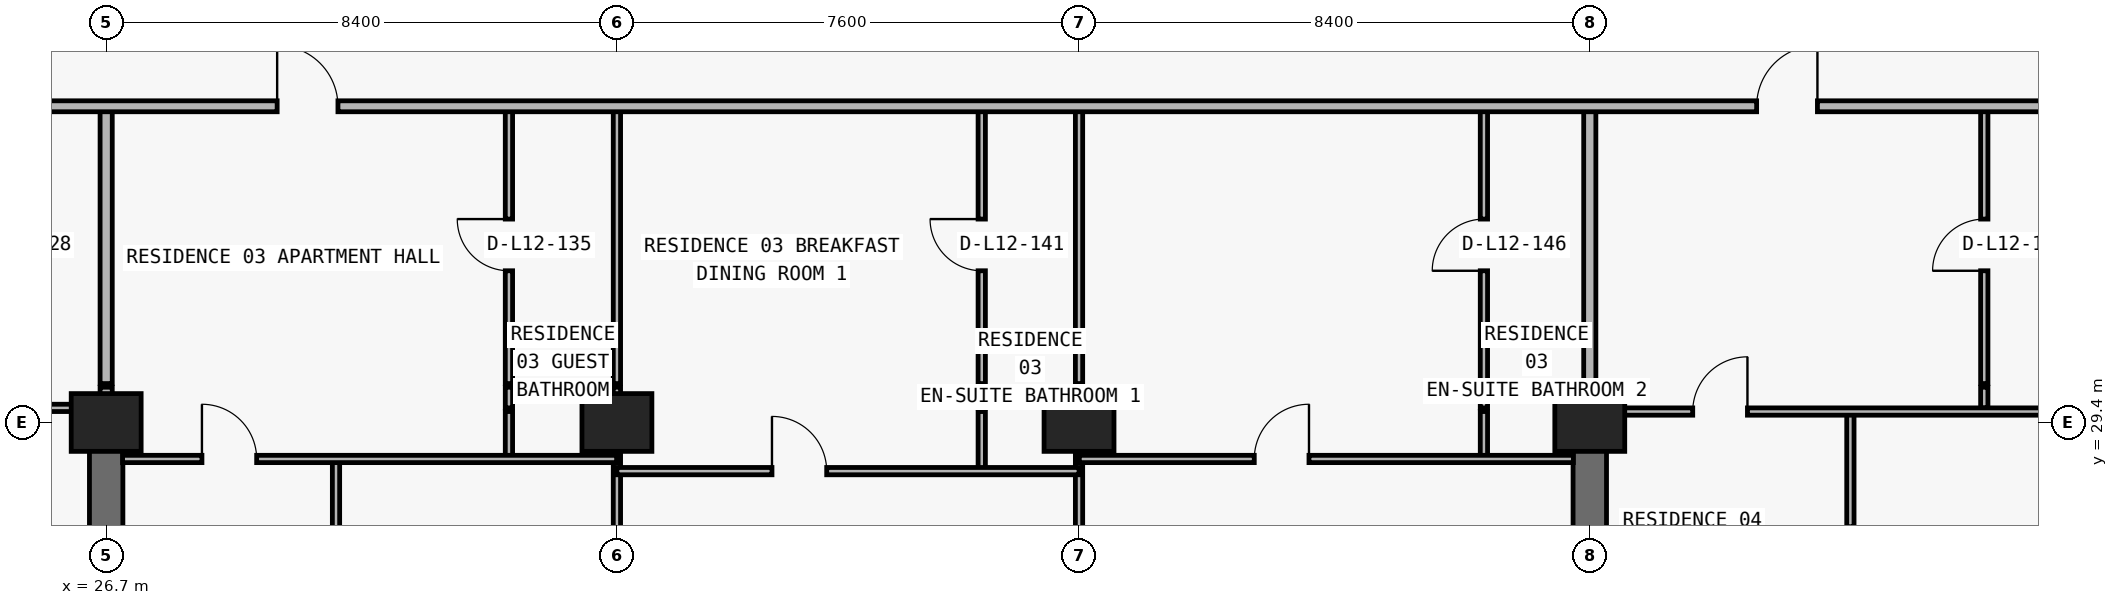
"""IFC4 building model, lengths in metres.
Left out: names, types, materials, properties, quantities, classifications, styles, units other than length and angle.
Written with IfcOpenShell. Run it as: python <this file> out.ifc"""

import sys

from ifc_helpers import new_model, si_unit, direction, frame, frame_2d, origin, origin_2d, place, context, subcontext, project, spatial, rectangle, extrude, element, fill, save


model = new_model("IFC4")
c1 = context("Model", 3, precision=1e-05, world=origin(), true_north=direction((0.0, 1.0)))
c2 = subcontext(c1, "Body", "Model", "MODEL_VIEW")
j1 = project(units=[si_unit("LENGTHUNIT", "METRE"), si_unit("PLANEANGLEUNIT", "RADIAN")], contexts=[c1])
p1 = place(None, origin())
s1 = spatial("IfcSite", under=j1, at=p1, CompositionType="ELEMENT")
p2 = place(p1, origin())
s2 = spatial("IfcBuilding", under=s1, at=p2, CompositionType="ELEMENT")
p3 = place(p2, frame((0.0, 0.0, 49.8)))
s3 = spatial("IfcBuildingStorey", under=s2, at=p3, CompositionType="ELEMENT", Elevation=49.8)
for number, where, z_axis, x_axis in (
    (1, (26.7, 29.4, 0.0), (0.0, 0.0, 1.0), (1.0, 0.0, 0.0)),
    (2, (35.1, 29.4, 0.0), (0.0, 0.0, 1.0), (1.0, 0.0, 0.0)),
    (3, (42.7, 29.4, 0.0), (0.0, 0.0, 1.0), (1.0, 0.0, 0.0)),
    (4, (51.1, 29.4, 0.0), (0.0, 0.0, 1.0), (1.0, 0.0, 0.0)),
):
    element("IfcColumn", number, at=place(p3, frame(where, z_axis=z_axis, x_axis=x_axis)), inside=s3, PredefinedType="COLUMN", context=c2, shape_type="SweptSolid", body=[
        extrude(rectangle(XDim=1.15, YDim=0.95, at=origin_2d()), origin(), (0.0, 0.0, 1.0), 3.05),
    ])
for number, where, z_axis, x_axis in (
    (5, (26.7, 20.8, 0.0), (0.0, 0.0, 1.0), (0.0, 1.0, 0.0)),
    (6, (51.1, 20.8, 0.0), (0.0, 0.0, 1.0), (0.0, 1.0, 0.0)),
):
    element("IfcWall", number, at=place(p3, frame(where, z_axis=z_axis, x_axis=x_axis)), inside=s3, PredefinedType="SHEAR", context=c2, shape_type="SweptSolid", body=[
        extrude(rectangle(XDim=8.6, YDim=0.55, at=frame_2d((4.3, 0.0))), origin(), (0.0, 0.0, 1.0), 3.05),
    ])
p4 = place(p3, frame((26.7, 29.64, 0.0), z_axis=(0.0, 0.0, 1.0), x_axis=(0.0, 1.0, 0.0)))
e7 = element("IfcWall", 7, at=p4, inside=s3, PredefinedType="PARTITIONING", context=c2, shape_type="SweptSolid", body=[
    extrude(rectangle(XDim=0.34, YDim=0.2, at=frame_2d((0.17, 0.0))), origin(), (0.0, 0.0, 1.0), 2.335),
])
p5 = place(p3, frame((26.7, 30.04, 0.0), z_axis=(0.0, 0.0, 1.0), x_axis=(0.0, 1.0, 0.0)))
e8 = element("IfcWall", 8, at=p5, inside=s3, PredefinedType="PARTITIONING", context=c2, shape_type="SweptSolid", body=[
    extrude(rectangle(XDim=4.56, YDim=0.2, at=frame_2d((2.28, 0.0))), origin(), (0.0, 0.0, 1.0), 2.335),
])
p6 = place(p3, frame((30.48, 24.89, 0.0), z_axis=(0.0, 0.0, 1.0), x_axis=(0.0, 1.0, 0.0)))
e9 = element("IfcWall", 9, at=p6, inside=s3, PredefinedType="PARTITIONING", context=c2, shape_type="SweptSolid", body=[
    extrude(rectangle(XDim=3.91, YDim=0.12, at=frame_2d((1.955, 0.0))), origin(), (0.0, 0.0, 1.0), 3.05),
])
p7 = place(p6, frame((1.505, 0.0, 0.0)))
e10 = element("IfcOpeningElement", 10, at=p7, cuts=e9, PredefinedType="OPENING", context=c2, shape_type="SweptSolid", body=[
    extrude(rectangle(XDim=0.9, YDim=2.15, at=frame_2d((0.45, 1.075))), frame((0.0, 0.07, 0.0), z_axis=(0.0, -1.0, 0.0), x_axis=(1.0, 0.0, 0.0)), (0.0, 0.0, 1.0), 0.14),
])
p8 = place(p3, frame((33.324, 28.8, 0.0), z_axis=(0.0, 0.0, 1.0), x_axis=(0.0, 1.0, 0.0)))
e11 = element("IfcWall", 11, at=p8, inside=s3, PredefinedType="PARTITIONING", context=c2, shape_type="SweptSolid", body=[
    extrude(rectangle(XDim=0.78, YDim=0.12, at=frame_2d((0.39, 0.0))), origin(), (0.0, 0.0, 1.0), 3.05),
])
p9 = place(p3, frame((33.324, 29.64, 0.0), z_axis=(0.0, 0.0, 1.0), x_axis=(0.0, 1.0, 0.0)))
e12 = element("IfcWall", 12, at=p9, inside=s3, PredefinedType="PARTITIONING", context=c2, shape_type="SweptSolid", body=[
    extrude(rectangle(XDim=0.34, YDim=0.12, at=frame_2d((0.17, 0.0))), origin(), (0.0, 0.0, 1.0), 3.05),
])
p10 = place(p3, frame((33.324, 30.04, 0.0), z_axis=(0.0, 0.0, 1.0), x_axis=(0.0, 1.0, 0.0)))
e13 = element("IfcWall", 13, at=p10, inside=s3, PredefinedType="PARTITIONING", context=c2, shape_type="SweptSolid", body=[
    extrude(rectangle(XDim=4.56, YDim=0.12, at=frame_2d((2.28, 0.0))), origin(), (0.0, 0.0, 1.0), 3.05),
])
p11 = place(p10, frame((1.855, 0.0, 0.0)))
e14 = element("IfcOpeningElement", 14, at=p11, cuts=e13, PredefinedType="OPENING", context=c2, shape_type="SweptSolid", body=[
    extrude(rectangle(XDim=0.85, YDim=2.1, at=frame_2d((0.425, 1.05))), frame((0.0, 0.07, 0.0), z_axis=(0.0, -1.0, 0.0), x_axis=(1.0, 0.0, 0.0)), (0.0, 0.0, 1.0), 0.14),
])
p12 = place(p3, frame((35.1, 24.89, 0.0), z_axis=(0.0, 0.0, 1.0), x_axis=(0.0, 1.0, 0.0)))
e15 = element("IfcWall", 15, at=p12, inside=s3, PredefinedType="PARTITIONING", context=c2, shape_type="SweptSolid", body=[
    extrude(rectangle(XDim=4.69, YDim=0.12, at=frame_2d((2.345, 0.0))), origin(), (0.0, 0.0, 1.0), 2.11),
])
p13 = place(p12, frame((1.405, 0.0, 0.0)))
e16 = element("IfcOpeningElement", 16, at=p13, cuts=e15, PredefinedType="OPENING", context=c2, shape_type="SweptSolid", body=[
    extrude(rectangle(XDim=0.9, YDim=2.06, at=frame_2d((0.45, 1.03))), frame((0.0, 0.07, 0.0), z_axis=(0.0, -1.0, 0.0), x_axis=(1.0, 0.0, 0.0)), (0.0, 0.0, 1.0), 0.14),
])
p14 = place(p3, frame((35.1, 29.64, 0.0), z_axis=(0.0, 0.0, 1.0), x_axis=(0.0, 1.0, 0.0)))
e17 = element("IfcWall", 17, at=p14, inside=s3, PredefinedType="PARTITIONING", context=c2, shape_type="SweptSolid", body=[
    extrude(rectangle(XDim=0.34, YDim=0.12, at=frame_2d((0.17, 0.0))), origin(), (0.0, 0.0, 1.0), 2.11),
])
p15 = place(p3, frame((35.1, 30.04, 0.0), z_axis=(0.0, 0.0, 1.0), x_axis=(0.0, 1.0, 0.0)))
e18 = element("IfcWall", 18, at=p15, inside=s3, PredefinedType="PARTITIONING", context=c2, shape_type="SweptSolid", body=[
    extrude(rectangle(XDim=4.56, YDim=0.12, at=frame_2d((2.28, 0.0))), origin(), (0.0, 0.0, 1.0), 2.11),
])
p16 = place(p3, frame((41.1, 28.6, 0.0), z_axis=(0.0, 0.0, 1.0), x_axis=(0.0, 1.0, 0.0)))
e19 = element("IfcWall", 19, at=p16, inside=s3, PredefinedType="PARTITIONING", context=c2, shape_type="SweptSolid", body=[
    extrude(rectangle(XDim=0.98, YDim=0.12, at=frame_2d((0.49, 0.0))), origin(), (0.0, 0.0, 1.0), 3.05),
])
p17 = place(p3, frame((41.1, 29.64, 0.0), z_axis=(0.0, 0.0, 1.0), x_axis=(0.0, 1.0, 0.0)))
e20 = element("IfcWall", 20, at=p17, inside=s3, PredefinedType="PARTITIONING", context=c2, shape_type="SweptSolid", body=[
    extrude(rectangle(XDim=0.34, YDim=0.12, at=frame_2d((0.17, 0.0))), origin(), (0.0, 0.0, 1.0), 3.05),
])
p18 = place(p3, frame((41.1, 30.04, 0.0), z_axis=(0.0, 0.0, 1.0), x_axis=(0.0, 1.0, 0.0)))
e21 = element("IfcWall", 21, at=p18, inside=s3, PredefinedType="PARTITIONING", context=c2, shape_type="SweptSolid", body=[
    extrude(rectangle(XDim=4.56, YDim=0.12, at=frame_2d((2.28, 0.0))), origin(), (0.0, 0.0, 1.0), 3.05),
])
p19 = place(p18, frame((1.855, 0.0, 0.0)))
e22 = element("IfcOpeningElement", 22, at=p19, cuts=e21, PredefinedType="OPENING", context=c2, shape_type="SweptSolid", body=[
    extrude(rectangle(XDim=0.85, YDim=2.1, at=frame_2d((0.425, 1.05))), frame((0.0, 0.07, 0.0), z_axis=(0.0, -1.0, 0.0), x_axis=(1.0, 0.0, 0.0)), (0.0, 0.0, 1.0), 0.14),
])
p20 = place(p3, frame((42.7, 24.89, 0.0), z_axis=(0.0, 0.0, 1.0), x_axis=(0.0, 1.0, 0.0)))
e23 = element("IfcWall", 23, at=p20, inside=s3, PredefinedType="PARTITIONING", context=c2, shape_type="SweptSolid", body=[
    extrude(rectangle(XDim=4.69, YDim=0.12, at=frame_2d((2.345, 0.0))), origin(), (0.0, 0.0, 1.0), 2.11),
])
p21 = place(p20, frame((1.405, 0.0, 0.0)))
e24 = element("IfcOpeningElement", 24, at=p21, cuts=e23, PredefinedType="OPENING", context=c2, shape_type="SweptSolid", body=[
    extrude(rectangle(XDim=0.9, YDim=2.06, at=frame_2d((0.45, 1.03))), frame((0.0, 0.07, 0.0), z_axis=(0.0, -1.0, 0.0), x_axis=(1.0, 0.0, 0.0)), (0.0, 0.0, 1.0), 0.14),
])
p22 = place(p3, frame((42.7, 29.64, 0.0), z_axis=(0.0, 0.0, 1.0), x_axis=(0.0, 1.0, 0.0)))
e25 = element("IfcWall", 25, at=p22, inside=s3, PredefinedType="PARTITIONING", context=c2, shape_type="SweptSolid", body=[
    extrude(rectangle(XDim=0.34, YDim=0.12, at=frame_2d((0.17, 0.0))), origin(), (0.0, 0.0, 1.0), 2.11),
])
p23 = place(p3, frame((42.7, 30.04, 0.0), z_axis=(0.0, 0.0, 1.0), x_axis=(0.0, 1.0, 0.0)))
e26 = element("IfcWall", 26, at=p23, inside=s3, PredefinedType="PARTITIONING", context=c2, shape_type="SweptSolid", body=[
    extrude(rectangle(XDim=4.56, YDim=0.12, at=frame_2d((2.28, 0.0))), origin(), (0.0, 0.0, 1.0), 2.11),
])
p24 = place(p3, frame((49.359, 28.8, 0.0), z_axis=(0.0, 0.0, 1.0), x_axis=(0.0, 1.0, 0.0)))
e27 = element("IfcWall", 27, at=p24, inside=s3, PredefinedType="PARTITIONING", context=c2, shape_type="SweptSolid", body=[
    extrude(rectangle(XDim=0.78, YDim=0.12, at=frame_2d((0.39, 0.0))), origin(), (0.0, 0.0, 1.0), 3.05),
])
p25 = place(p3, frame((49.359, 29.64, 0.0), z_axis=(0.0, 0.0, 1.0), x_axis=(0.0, 1.0, 0.0)))
e28 = element("IfcWall", 28, at=p25, inside=s3, PredefinedType="PARTITIONING", context=c2, shape_type="SweptSolid", body=[
    extrude(rectangle(XDim=0.34, YDim=0.12, at=frame_2d((0.17, 0.0))), origin(), (0.0, 0.0, 1.0), 3.05),
])
p26 = place(p3, frame((49.359, 30.04, 0.0), z_axis=(0.0, 0.0, 1.0), x_axis=(0.0, 1.0, 0.0)))
e29 = element("IfcWall", 29, at=p26, inside=s3, PredefinedType="PARTITIONING", context=c2, shape_type="SweptSolid", body=[
    extrude(rectangle(XDim=4.56, YDim=0.12, at=frame_2d((2.28, 0.0))), origin(), (0.0, 0.0, 1.0), 3.05),
])
p27 = place(p26, frame((1.855, 0.0, 0.0)))
e30 = element("IfcOpeningElement", 30, at=p27, cuts=e29, PredefinedType="OPENING", context=c2, shape_type="SweptSolid", body=[
    extrude(rectangle(XDim=0.85, YDim=2.1, at=frame_2d((0.425, 1.05))), frame((0.0, 0.07, 0.0), z_axis=(0.0, -1.0, 0.0), x_axis=(1.0, 0.0, 0.0)), (0.0, 0.0, 1.0), 0.14),
])
p28 = place(p3, frame((51.1, 29.64, 0.0), z_axis=(0.0, 0.0, 1.0), x_axis=(0.0, 1.0, 0.0)))
e31 = element("IfcWall", 31, at=p28, inside=s3, PredefinedType="PARTITIONING", context=c2, shape_type="SweptSolid", body=[
    extrude(rectangle(XDim=0.34, YDim=0.2, at=frame_2d((0.17, 0.0))), origin(), (0.0, 0.0, 1.0), 2.335),
])
p29 = place(p3, frame((51.1, 30.04, 0.0), z_axis=(0.0, 0.0, 1.0), x_axis=(0.0, 1.0, 0.0)))
e32 = element("IfcWall", 32, at=p29, inside=s3, PredefinedType="PARTITIONING", context=c2, shape_type="SweptSolid", body=[
    extrude(rectangle(XDim=4.56, YDim=0.2, at=frame_2d((2.28, 0.0))), origin(), (0.0, 0.0, 1.0), 2.335),
])
p30 = place(p3, frame((55.386, 24.89, 0.0), z_axis=(0.0, 0.0, 1.0), x_axis=(0.0, 1.0, 0.0)))
e33 = element("IfcWall", 33, at=p30, inside=s3, PredefinedType="PARTITIONING", context=c2, shape_type="SweptSolid", body=[
    extrude(rectangle(XDim=4.69, YDim=0.12, at=frame_2d((2.345, 0.0))), origin(), (0.0, 0.0, 1.0), 3.05),
])
p31 = place(p30, frame((1.895, 0.0, 0.0)))
e34 = element("IfcOpeningElement", 34, at=p31, cuts=e33, PredefinedType="OPENING", context=c2, shape_type="SweptSolid", body=[
    extrude(rectangle(XDim=0.9, YDim=2.15, at=frame_2d((0.45, 1.075))), frame((0.0, 0.07, 0.0), z_axis=(0.0, -1.0, 0.0), x_axis=(1.0, 0.0, 0.0)), (0.0, 0.0, 1.0), 0.14),
])
p32 = place(p3, frame((57.588, 29.64, 0.0), z_axis=(0.0, 0.0, 1.0), x_axis=(0.0, 1.0, 0.0)))
e35 = element("IfcWall", 35, at=p32, inside=s3, PredefinedType="PARTITIONING", context=c2, shape_type="SweptSolid", body=[
    extrude(rectangle(XDim=0.34, YDim=0.12, at=frame_2d((0.17, 0.0))), origin(), (0.0, 0.0, 1.0), 3.05),
])
p33 = place(p3, frame((57.588, 30.04, 0.0), z_axis=(0.0, 0.0, 1.0), x_axis=(0.0, 1.0, 0.0)))
e36 = element("IfcWall", 36, at=p33, inside=s3, PredefinedType="PARTITIONING", context=c2, shape_type="SweptSolid", body=[
    extrude(rectangle(XDim=4.56, YDim=0.12, at=frame_2d((2.28, 0.0))), origin(), (0.0, 0.0, 1.0), 3.05),
])
p34 = place(p33, frame((1.855, 0.0, 0.0)))
e37 = element("IfcOpeningElement", 37, at=p34, cuts=e36, PredefinedType="OPENING", context=c2, shape_type="SweptSolid", body=[
    extrude(rectangle(XDim=0.85, YDim=2.1, at=frame_2d((0.425, 1.05))), frame((0.0, 0.07, 0.0), z_axis=(0.0, -1.0, 0.0), x_axis=(1.0, 0.0, 0.0)), (0.0, 0.0, 1.0), 0.14),
])
p35 = place(p3, frame((35.1, 28.6, 0.0), z_axis=(0.0, 0.0, 1.0), x_axis=(1.0, 0.0, 0.0)))
e38 = element("IfcWall", 38, at=p35, inside=s3, PredefinedType="PARTITIONING", context=c2, shape_type="SweptSolid", body=[
    extrude(rectangle(XDim=7.6, YDim=0.12, at=frame_2d((3.8, 0.0))), origin(), (0.0, 0.0, 1.0), 3.05),
])
p36 = place(p35, frame((2.55, 0.0, 0.0)))
e39 = element("IfcOpeningElement", 39, at=p36, cuts=e38, PredefinedType="OPENING", context=c2, shape_type="SweptSolid", body=[
    extrude(rectangle(XDim=0.9, YDim=2.15, at=frame_2d((0.45, 1.075))), frame((0.0, 0.07, 0.0), z_axis=(0.0, -1.0, 0.0), x_axis=(1.0, 0.0, 0.0)), (0.0, 0.0, 1.0), 0.14),
])
p37 = place(p3, frame((26.97, 28.8, 0.0), z_axis=(0.0, 0.0, 1.0), x_axis=(1.0, 0.0, 0.0)))
e40 = element("IfcWall", 40, at=p37, inside=s3, PredefinedType="PARTITIONING", context=c2, shape_type="SweptSolid", body=[
    extrude(rectangle(XDim=8.125, YDim=0.12, at=frame_2d((4.062, 0.0))), origin(), (0.0, 0.0, 1.0), 3.05),
])
p38 = place(p37, frame((1.305, 0.0, 0.0)))
e41 = element("IfcOpeningElement", 41, at=p38, cuts=e40, PredefinedType="OPENING", context=c2, shape_type="SweptSolid", body=[
    extrude(rectangle(XDim=0.9, YDim=2.15, at=frame_2d((0.45, 1.075))), frame((0.0, 0.07, 0.0), z_axis=(0.0, -1.0, 0.0), x_axis=(1.0, 0.0, 0.0)), (0.0, 0.0, 1.0), 0.14),
])
p39 = place(p3, frame((42.705, 28.8, 0.0), z_axis=(0.0, 0.0, 1.0), x_axis=(1.0, 0.0, 0.0)))
e42 = element("IfcWall", 42, at=p39, inside=s3, PredefinedType="PARTITIONING", context=c2, shape_type="SweptSolid", body=[
    extrude(rectangle(XDim=8.125, YDim=0.12, at=frame_2d((4.062, 0.0))), origin(), (0.0, 0.0, 1.0), 3.05),
])
p40 = place(p39, frame((2.877, 0.0, 0.0)))
e43 = element("IfcOpeningElement", 43, at=p40, cuts=e42, PredefinedType="OPENING", context=c2, shape_type="SweptSolid", body=[
    extrude(rectangle(XDim=0.9, YDim=2.15, at=frame_2d((0.45, 1.075))), frame((0.0, 0.07, 0.0), z_axis=(0.0, -1.0, 0.0), x_axis=(1.0, 0.0, 0.0)), (0.0, 0.0, 1.0), 0.14),
])
p41 = place(p3, frame((51.1, 29.58, 0.0), z_axis=(0.0, 0.0, 1.0), x_axis=(1.0, 0.0, 0.0)))
e44 = element("IfcWall", 44, at=p41, inside=s3, PredefinedType="PARTITIONING", context=c2, shape_type="SweptSolid", body=[
    extrude(rectangle(XDim=8.4, YDim=0.12, at=frame_2d((4.2, 0.0))), origin(), (0.0, 0.0, 1.0), 2.11),
])
p42 = place(p41, frame((1.693, 0.0, 0.0)))
e45 = element("IfcOpeningElement", 45, at=p42, cuts=e44, PredefinedType="OPENING", context=c2, shape_type="SweptSolid", body=[
    extrude(rectangle(XDim=0.9, YDim=2.06, at=frame_2d((0.45, 1.03))), frame((0.0, 0.07, 0.0), z_axis=(0.0, -1.0, 0.0), x_axis=(1.0, 0.0, 0.0)), (0.0, 0.0, 1.0), 0.14),
])
p43 = place(p3, frame((18.3, 29.64, 0.0), z_axis=(0.0, 0.0, 1.0), x_axis=(1.0, 0.0, 0.0)))
e46 = element("IfcWall", 46, at=p43, inside=s3, PredefinedType="PARTITIONING", context=c2, shape_type="SweptSolid", body=[
    extrude(rectangle(XDim=8.4, YDim=0.12, at=frame_2d((4.2, 0.0))), origin(), (0.0, 0.0, 1.0), 2.11),
])
p44 = place(p43, frame((1.818, 0.0, 0.0)))
e47 = element("IfcOpeningElement", 47, at=p44, cuts=e46, PredefinedType="OPENING", context=c2, shape_type="SweptSolid", body=[
    extrude(rectangle(XDim=0.9, YDim=2.06, at=frame_2d((0.45, 1.03))), frame((0.0, 0.07, 0.0), z_axis=(0.0, -1.0, 0.0), x_axis=(1.0, 0.0, 0.0)), (0.0, 0.0, 1.0), 0.14),
])
p45 = place(p3, frame((5.105, 34.6, 0.0), z_axis=(0.0, 0.0, 1.0), x_axis=(1.0, 0.0, 0.0)))
e48 = element("IfcWall", 48, at=p45, inside=s3, PredefinedType="PARTITIONING", context=c2, shape_type="SweptSolid", body=[
    extrude(rectangle(XDim=67.595, YDim=0.18, at=frame_2d((33.797, 0.0))), origin(), (0.0, 0.0, 1.0), 3.05),
])
p46 = place(p45, frame((7.365, 0.0, 0.0)))
e49 = element("IfcOpeningElement", 49, at=p46, cuts=e48, PredefinedType="OPENING", context=c2, shape_type="SweptSolid", body=[
    extrude(rectangle(XDim=1.0, YDim=2.2, at=frame_2d((0.5, 1.1))), frame((0.0, 0.1, 0.0), z_axis=(0.0, -1.0, 0.0), x_axis=(1.0, 0.0, 0.0)), (0.0, 0.0, 1.0), 0.2),
])
p47 = place(p45, frame((15.927, 0.0, 0.0)))
e50 = element("IfcOpeningElement", 50, at=p47, cuts=e48, PredefinedType="OPENING", context=c2, shape_type="SweptSolid", body=[
    extrude(rectangle(XDim=1.0, YDim=2.2, at=frame_2d((0.5, 1.1))), frame((0.0, 0.1, 0.0), z_axis=(0.0, -1.0, 0.0), x_axis=(1.0, 0.0, 0.0)), (0.0, 0.0, 1.0), 0.2),
])
p48 = place(p45, frame((24.407, 0.0, 0.0)))
e51 = element("IfcOpeningElement", 51, at=p48, cuts=e48, PredefinedType="OPENING", context=c2, shape_type="SweptSolid", body=[
    extrude(rectangle(XDim=1.0, YDim=2.2, at=frame_2d((0.5, 1.1))), frame((0.0, 0.1, 0.0), z_axis=(0.0, -1.0, 0.0), x_axis=(1.0, 0.0, 0.0)), (0.0, 0.0, 1.0), 0.2),
])
p49 = place(p45, frame((48.739, 0.0, 0.0)))
e52 = element("IfcOpeningElement", 52, at=p49, cuts=e48, PredefinedType="OPENING", context=c2, shape_type="SweptSolid", body=[
    extrude(rectangle(XDim=1.0, YDim=2.2, at=frame_2d((0.5, 1.1))), frame((0.0, 0.1, 0.0), z_axis=(0.0, -1.0, 0.0), x_axis=(1.0, 0.0, 0.0)), (0.0, 0.0, 1.0), 0.2),
])
p50 = place(p45, frame((56.98, 0.0, 0.0)))
e53 = element("IfcOpeningElement", 53, at=p50, cuts=e48, PredefinedType="OPENING", context=c2, shape_type="SweptSolid", body=[
    extrude(rectangle(XDim=1.0, YDim=2.2, at=frame_2d((0.5, 1.1))), frame((0.0, 0.1, 0.0), z_axis=(0.0, -1.0, 0.0), x_axis=(1.0, 0.0, 0.0)), (0.0, 0.0, 1.0), 0.2),
])
p51 = place(p48, origin())
e54 = element("IfcDoor", 54, at=p51, inside=s3, OperationType="SINGLE_SWING_LEFT", PredefinedType="DOOR", context=c2, shape_type="SweptSolid", body=[
    extrude(rectangle(XDim=1.0, YDim=2.2, at=frame_2d((0.5, 1.1))), frame((0.0, 0.025, 0.0), z_axis=(0.0, -1.0, 0.0), x_axis=(1.0, 0.0, 0.0)), (0.0, 0.0, 1.0), 0.05),
])
fill(e51, e54)
p52 = place(p11, origin())
e55 = element("IfcDoor", 55, at=p52, inside=s3, OperationType="SINGLE_SWING_RIGHT", PredefinedType="DOOR", context=c2, shape_type="SweptSolid", body=[
    extrude(rectangle(XDim=0.85, YDim=2.1, at=frame_2d((0.425, 1.05))), frame((0.0, 0.025, 0.0), z_axis=(0.0, -1.0, 0.0), x_axis=(1.0, 0.0, 0.0)), (0.0, 0.0, 1.0), 0.05),
])
fill(e14, e55)
p53 = place(p38, origin())
e56 = element("IfcDoor", 56, at=p53, inside=s3, OperationType="SINGLE_SWING_LEFT", PredefinedType="DOOR", context=c2, shape_type="SweptSolid", body=[
    extrude(rectangle(XDim=0.9, YDim=2.15, at=frame_2d((0.45, 1.075))), frame((0.0, 0.025, 0.0), z_axis=(0.0, -1.0, 0.0), x_axis=(1.0, 0.0, 0.0)), (0.0, 0.0, 1.0), 0.05),
])
fill(e41, e56)
p54 = place(p36, origin())
e57 = element("IfcDoor", 57, at=p54, inside=s3, OperationType="SINGLE_SWING_LEFT", PredefinedType="DOOR", context=c2, shape_type="SweptSolid", body=[
    extrude(rectangle(XDim=0.9, YDim=2.15, at=frame_2d((0.45, 1.075))), frame((0.0, 0.025, 0.0), z_axis=(0.0, -1.0, 0.0), x_axis=(1.0, 0.0, 0.0)), (0.0, 0.0, 1.0), 0.05),
])
fill(e39, e57)
p55 = place(p19, origin())
e58 = element("IfcDoor", 58, at=p55, inside=s3, OperationType="SINGLE_SWING_RIGHT", PredefinedType="DOOR", context=c2, shape_type="SweptSolid", body=[
    extrude(rectangle(XDim=0.85, YDim=2.1, at=frame_2d((0.425, 1.05))), frame((0.0, 0.025, 0.0), z_axis=(0.0, -1.0, 0.0), x_axis=(1.0, 0.0, 0.0)), (0.0, 0.0, 1.0), 0.05),
])
fill(e22, e58)
p56 = place(p40, origin())
e59 = element("IfcDoor", 59, at=p56, inside=s3, OperationType="SINGLE_SWING_RIGHT", PredefinedType="DOOR", context=c2, shape_type="SweptSolid", body=[
    extrude(rectangle(XDim=0.9, YDim=2.15, at=frame_2d((0.45, 1.075))), frame((0.0, 0.025, 0.0), z_axis=(0.0, -1.0, 0.0), x_axis=(1.0, 0.0, 0.0)), (0.0, 0.0, 1.0), 0.05),
])
fill(e43, e59)
p57 = place(p27, origin())
e60 = element("IfcDoor", 60, at=p57, inside=s3, OperationType="SINGLE_SWING_LEFT", PredefinedType="DOOR", context=c2, shape_type="SweptSolid", body=[
    extrude(rectangle(XDim=0.85, YDim=2.1, at=frame_2d((0.425, 1.05))), frame((0.0, 0.025, 0.0), z_axis=(0.0, -1.0, 0.0), x_axis=(1.0, 0.0, 0.0)), (0.0, 0.0, 1.0), 0.05),
])
fill(e30, e60)
p58 = place(p49, origin())
e61 = element("IfcDoor", 61, at=p58, inside=s3, OperationType="SINGLE_SWING_RIGHT", PredefinedType="DOOR", context=c2, shape_type="SweptSolid", body=[
    extrude(rectangle(XDim=1.0, YDim=2.2, at=frame_2d((0.5, 1.1))), frame((0.0, 0.025, 0.0), z_axis=(0.0, -1.0, 0.0), x_axis=(1.0, 0.0, 0.0)), (0.0, 0.0, 1.0), 0.05),
])
fill(e52, e61)
p59 = place(p34, origin())
e62 = element("IfcDoor", 62, at=p59, inside=s3, OperationType="SINGLE_SWING_LEFT", PredefinedType="DOOR", context=c2, shape_type="SweptSolid", body=[
    extrude(rectangle(XDim=0.85, YDim=2.1, at=frame_2d((0.425, 1.05))), frame((0.0, 0.025, 0.0), z_axis=(0.0, -1.0, 0.0), x_axis=(1.0, 0.0, 0.0)), (0.0, 0.0, 1.0), 0.05),
])
fill(e37, e62)
p60 = place(p42, origin())
e63 = element("IfcDoor", 63, at=p60, inside=s3, OperationType="SINGLE_SWING_RIGHT", PredefinedType="DOOR", context=c2, shape_type="SweptSolid", body=[
    extrude(rectangle(XDim=0.9, YDim=2.06, at=frame_2d((0.45, 1.03))), frame((0.0, 0.025, 0.0), z_axis=(0.0, -1.0, 0.0), x_axis=(1.0, 0.0, 0.0)), (0.0, 0.0, 1.0), 0.05),
])
fill(e45, e63)
save(model, sys.argv[1])
